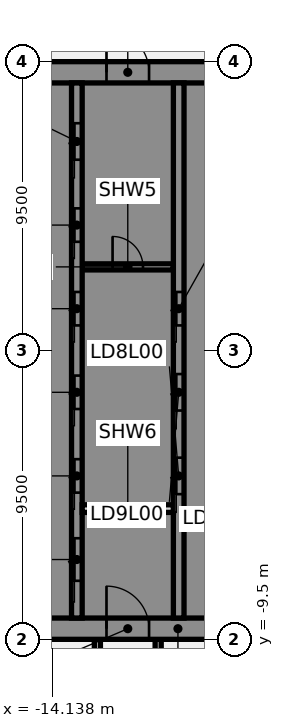
"""IFC4 building model, lengths in metres.
Left out: names, types, materials, properties, quantities, classifications, styles, units other than length and angle.
Written with IfcOpenShell. Run it as: python <this file> out.ifc"""

import sys

from ifc_helpers import new_model, si_unit, direction, frame, frame_2d, origin, place, context, subcontext, project, spatial, polyline, rectangle, outline, extrude, element, fill, save


model = new_model("IFC4")
c1 = context("Model", 3, precision=1e-05, world=origin(), true_north=direction((0.0, 1.0)))
c2 = subcontext(c1, "Body", "Model", "MODEL_VIEW")
j1 = project(units=[si_unit("LENGTHUNIT", "METRE"), si_unit("PLANEANGLEUNIT", "RADIAN")], contexts=[c1])
p1 = place(None, origin())
s1 = spatial("IfcSite", under=j1, at=p1, CompositionType="ELEMENT")
p2 = place(p1, origin())
s2 = spatial("IfcBuilding", under=s1, at=p2, CompositionType="ELEMENT")
p3 = place(p2, origin())
s3 = spatial("IfcBuildingStorey", under=s2, at=p3, CompositionType="ELEMENT", Elevation=0.0)
p4 = place(p3, frame((-10.65, -9.5, 0.0), z_axis=(0.0, 0.0, 1.0), x_axis=(0.0, -1.0, 0.0)))
e1 = element("IfcWall", 1, at=p4, inside=s3, PredefinedType="PARTITIONING", context=c2, shape_type="SweptSolid", body=[
    extrude(rectangle(XDim=1.45, YDim=0.2, at=frame_2d((0.725, 0.0))), origin(), (0.0, 0.0, 1.0), 8.5),
])
p5 = place(p3, frame((-12.65, -9.5, 0.0), z_axis=(0.0, 0.0, 1.0), x_axis=(0.0, -1.0, 0.0)))
e2 = element("IfcWall", 2, at=p5, inside=s3, PredefinedType="PARTITIONING", context=c2, shape_type="SweptSolid", body=[
    extrude(rectangle(XDim=1.47, YDim=0.2, at=frame_2d((0.735, 0.0))), origin(), (0.0, 0.0, 1.0), 8.5),
])
p6 = place(p3, frame((-16.5, -9.15, 0.0), z_axis=(0.0, 0.0, 1.0), x_axis=(1.0, 0.0, 0.0)))
e3 = element("IfcWall", 3, at=p6, inside=s3, PredefinedType="SHEAR", context=c2, shape_type="SweptSolid", body=[
    extrude(rectangle(XDim=13.0, YDim=0.7, at=frame_2d((6.5, 0.0))), origin(), (0.0, 0.0, 1.0), 8.5),
])
p7 = place(p6, frame((4.15, 0.0, 0.0)))
e4 = element("IfcOpeningElement", 4, at=p7, cuts=e3, PredefinedType="OPENING", context=c2, shape_type="SweptSolid", body=[
    extrude(rectangle(XDim=1.4, YDim=2.1, at=frame_2d((0.7, 1.05))), frame((0.0, 0.36, 0.0), z_axis=(0.0, -1.0, 0.0), x_axis=(1.0, 0.0, 0.0)), (0.0, 0.0, 1.0), 0.72),
])
p8 = place(p6, frame((10.125, 0.0, 0.0)))
e5 = element("IfcOpeningElement", 5, at=p8, cuts=e3, PredefinedType="OPENING", context=c2, shape_type="SweptSolid", body=[
    extrude(rectangle(XDim=1.4, YDim=2.1, at=frame_2d((0.7, 1.05))), frame((0.0, 0.36, 0.0), z_axis=(0.0, -1.0, 0.0), x_axis=(1.0, 0.0, 0.0)), (0.0, 0.0, 1.0), 0.72),
])
p9 = place(p3, frame((-16.5, 9.15, 0.0), z_axis=(0.0, 0.0, 1.0), x_axis=(1.0, 0.0, 0.0)))
e6 = element("IfcWall", 6, at=p9, inside=s3, PredefinedType="SHEAR", context=c2, shape_type="SweptSolid", body=[
    extrude(rectangle(XDim=13.0, YDim=0.7, at=frame_2d((6.5, 0.0))), origin(), (0.0, 0.0, 1.0), 8.5),
])
p10 = place(p9, frame((4.15, 0.0, 0.0)))
e7 = element("IfcOpeningElement", 7, at=p10, cuts=e6, PredefinedType="OPENING", context=c2, shape_type="SweptSolid", body=[
    extrude(rectangle(XDim=1.4, YDim=2.1, at=frame_2d((0.7, 1.05))), frame((0.0, 0.36, 0.0), z_axis=(0.0, -1.0, 0.0), x_axis=(1.0, 0.0, 0.0)), (0.0, 0.0, 1.0), 0.72),
])
p11 = place(p3, frame((-13.15, 2.75, 0.0), z_axis=(0.0, 0.0, 1.0), x_axis=(1.0, 0.0, 0.0)))
e8 = element("IfcWall", 8, at=p11, inside=s3, PredefinedType="PARTITIONING", context=c2, shape_type="SweptSolid", body=[
    extrude(rectangle(XDim=3.0, YDim=0.2, at=frame_2d((1.5, 0.0))), origin(), (0.0, 0.0, 1.0), 8.5),
])
p12 = place(p11, frame((1.0, 0.0, 0.0)))
e9 = element("IfcOpeningElement", 9, at=p12, cuts=e8, PredefinedType="OPENING", context=c2, shape_type="SweptSolid", body=[
    extrude(rectangle(XDim=1.0, YDim=2.1, at=frame_2d((0.5, 1.05))), frame((0.0, 0.11, 0.0), z_axis=(0.0, -1.0, 0.0), x_axis=(1.0, 0.0, 0.0)), (0.0, 0.0, 1.0), 0.22),
])
p13 = place(p3, origin())
e10 = element("IfcWall", 10, at=p13, inside=s3, PredefinedType="SHEAR", context=c2, shape_type="SweptSolid", body=[
    extrude(outline(polyline([(-13.5, -8.8), (-13.5, -8.125), (-15.8, -8.125), (-15.8, -5.625), (-13.5, -5.625), (-13.5, -5.375), (-15.8, -5.375), (-15.8, -2.875), (-13.5, -2.875), (-13.5, -2.625), (-15.8, -2.625), (-15.8, -0.125), (-13.5, -0.125), (-13.5, 0.125), (-15.8, 0.125), (-15.8, 2.625), (-13.5, 2.625), (-13.5, 2.875), (-15.8, 2.875), (-15.8, 5.375), (-13.5, 5.375), (-13.5, 5.625), (-15.8, 5.625), (-15.8, 8.125), (-13.5, 8.125), (-13.5, 8.8), (-15.8, 8.8), (-16.5, 8.8), (-16.5, -8.8), (-15.8, -8.8), (-13.5, -8.8)])), origin(), (0.0, 0.0, 1.0), 8.5),
])
p14 = place(p3, origin())
e11 = element("IfcWall", 11, at=p14, inside=s3, PredefinedType="SHEAR", context=c2, shape_type="SweptSolid", body=[
    extrude(outline(polyline([(-9.8, -5.375), (-9.8, -5.625), (-7.5, -5.625), (-7.15, -5.625), (-7.15, 8.8), (-7.5, 8.8), (-9.8, 8.8), (-9.8, 8.125), (-7.5, 8.125), (-7.5, 5.625), (-9.8, 5.625), (-9.8, 5.375), (-7.5, 5.375), (-7.5, 2.875), (-9.8, 2.875), (-9.8, 2.625), (-7.5, 2.625), (-7.5, 0.125), (-9.8, 0.125), (-9.8, -0.125), (-7.5, -0.125), (-7.5, -2.625), (-9.8, -2.625), (-9.8, -2.875), (-7.5, -2.875), (-7.5, -5.375), (-9.8, -5.375)])), origin(), (0.0, 0.0, 1.0), 8.5),
])
p15 = place(p3, origin())
e12 = element("IfcWall", 12, at=p15, inside=s3, PredefinedType="SHEAR", context=c2, shape_type="SweptSolid", body=[
    extrude(outline(polyline([(-7.5, -8.125), (-9.55, -8.125), (-9.55, -5.625), (-9.8, -5.625), (-9.8, -8.125), (-9.8, -8.8), (-7.5, -8.8), (-7.5, -8.125)])), origin(), (0.0, 0.0, 1.0), 8.5),
])
p16 = place(p3, frame((-13.325, -8.8, 0.0), z_axis=(0.0, 0.0, 1.0), x_axis=(0.0, 1.0, 0.0)))
e13 = element("IfcWall", 13, at=p16, inside=s3, PredefinedType="SHEAR", context=c2, shape_type="SweptSolid", body=[
    extrude(rectangle(XDim=17.6, YDim=0.35, at=frame_2d((8.8, 0.0))), origin(), (0.0, 0.0, 1.0), 8.5),
])
p17 = place(p16, frame((1.225, 0.0, 0.0)))
e14 = element("IfcOpeningElement", 14, at=p17, cuts=e13, PredefinedType="OPENING", context=c2, shape_type="SweptSolid", body=[
    extrude(rectangle(XDim=1.4, YDim=2.1, at=frame_2d((0.7, 1.05))), frame((0.0, 0.185, 0.0), z_axis=(0.0, -1.0, 0.0), x_axis=(1.0, 0.0, 0.0)), (0.0, 0.0, 1.0), 0.37),
])
p18 = place(p16, frame((4.125, 0.0, 0.0)))
e15 = element("IfcOpeningElement", 15, at=p18, cuts=e13, PredefinedType="OPENING", context=c2, shape_type="SweptSolid", body=[
    extrude(rectangle(XDim=1.1, YDim=2.1, at=frame_2d((0.55, 1.05))), frame((0.0, 0.185, 0.0), z_axis=(0.0, -1.0, 0.0), x_axis=(1.0, 0.0, 0.0)), (0.0, 0.0, 1.0), 0.37),
])
p19 = place(p16, frame((6.875, 0.0, 0.0)))
e16 = element("IfcOpeningElement", 16, at=p19, cuts=e13, PredefinedType="OPENING", context=c2, shape_type="SweptSolid", body=[
    extrude(rectangle(XDim=1.1, YDim=2.1, at=frame_2d((0.55, 1.05))), frame((0.0, 0.185, 0.0), z_axis=(0.0, -1.0, 0.0), x_axis=(1.0, 0.0, 0.0)), (0.0, 0.0, 1.0), 0.37),
])
p20 = place(p16, frame((9.625, 0.0, 0.0)))
e17 = element("IfcOpeningElement", 17, at=p20, cuts=e13, PredefinedType="OPENING", context=c2, shape_type="SweptSolid", body=[
    extrude(rectangle(XDim=1.1, YDim=2.1, at=frame_2d((0.55, 1.05))), frame((0.0, 0.185, 0.0), z_axis=(0.0, -1.0, 0.0), x_axis=(1.0, 0.0, 0.0)), (0.0, 0.0, 1.0), 0.37),
])
p21 = place(p16, frame((12.375, 0.0, 0.0)))
e18 = element("IfcOpeningElement", 18, at=p21, cuts=e13, PredefinedType="OPENING", context=c2, shape_type="SweptSolid", body=[
    extrude(rectangle(XDim=1.1, YDim=2.1, at=frame_2d((0.55, 1.05))), frame((0.0, 0.185, 0.0), z_axis=(0.0, -1.0, 0.0), x_axis=(1.0, 0.0, 0.0)), (0.0, 0.0, 1.0), 0.37),
])
p22 = place(p16, frame((15.075, 0.0, 0.0)))
e19 = element("IfcOpeningElement", 19, at=p22, cuts=e13, PredefinedType="OPENING", context=c2, shape_type="SweptSolid", body=[
    extrude(rectangle(XDim=1.2, YDim=2.1, at=frame_2d((0.6, 1.05))), frame((0.0, 0.185, 0.0), z_axis=(0.0, -1.0, 0.0), x_axis=(1.0, 0.0, 0.0)), (0.0, 0.0, 1.0), 0.37),
])
p23 = place(p3, frame((-9.975, -8.8, 0.0), z_axis=(0.0, 0.0, 1.0), x_axis=(0.0, 1.0, 0.0)))
e20 = element("IfcWall", 20, at=p23, inside=s3, PredefinedType="SHEAR", context=c2, shape_type="SweptSolid", body=[
    extrude(rectangle(XDim=17.6, YDim=0.35, at=frame_2d((8.8, 0.0))), origin(), (0.0, 0.0, 1.0), 8.5),
])
p24 = place(p23, frame((4.075, 0.0, 0.0)))
e21 = element("IfcOpeningElement", 21, at=p24, cuts=e20, PredefinedType="OPENING", context=c2, shape_type="SweptSolid", body=[
    extrude(rectangle(XDim=1.2, YDim=2.1, at=frame_2d((0.6, 1.05))), frame((0.0, 0.185, 0.0), z_axis=(0.0, -1.0, 0.0), x_axis=(1.0, 0.0, 0.0)), (0.0, 0.0, 1.0), 0.37),
])
p25 = place(p23, frame((6.825, 0.0, 0.0)))
e22 = element("IfcOpeningElement", 22, at=p25, cuts=e20, PredefinedType="OPENING", context=c2, shape_type="SweptSolid", body=[
    extrude(rectangle(XDim=1.2, YDim=2.1, at=frame_2d((0.6, 1.05))), frame((0.0, 0.185, 0.0), z_axis=(0.0, -1.0, 0.0), x_axis=(1.0, 0.0, 0.0)), (0.0, 0.0, 1.0), 0.37),
])
p26 = place(p23, frame((9.625, 0.0, 0.0)))
e23 = element("IfcOpeningElement", 23, at=p26, cuts=e20, PredefinedType="OPENING", context=c2, shape_type="SweptSolid", body=[
    extrude(rectangle(XDim=1.1, YDim=2.1, at=frame_2d((0.55, 1.05))), frame((0.0, 0.185, 0.0), z_axis=(0.0, -1.0, 0.0), x_axis=(1.0, 0.0, 0.0)), (0.0, 0.0, 1.0), 0.37),
])
p27 = place(p3, frame((-13.15, -5.2, 0.0), z_axis=(0.0, 0.0, 1.0), x_axis=(1.0, 0.0, 0.0)))
e24 = element("IfcWall", 24, at=p27, inside=s3, PredefinedType="PARTITIONING", context=c2, shape_type="SweptSolid", body=[
    extrude(rectangle(XDim=3.0, YDim=0.25, at=frame_2d((1.5, 0.0))), origin(), (0.0, 0.0, 1.0), 8.5),
])
p28 = place(p7, origin())
e25 = element("IfcDoor", 25, at=p28, inside=s3, OperationType="SINGLE_SWING_LEFT", PredefinedType="DOOR", context=c2, shape_type="SweptSolid", body=[
    extrude(rectangle(XDim=1.4, YDim=2.1, at=frame_2d((0.7, 1.05))), frame((0.0, 0.025, 0.0), z_axis=(0.0, -1.0, 0.0), x_axis=(1.0, 0.0, 0.0)), (0.0, 0.0, 1.0), 0.05),
])
fill(e4, e25)
p29 = place(p10, origin())
e26 = element("IfcDoor", 26, at=p29, inside=s3, OperationType="SINGLE_SWING_LEFT", PredefinedType="DOOR", context=c2, shape_type="SweptSolid", body=[
    extrude(rectangle(XDim=1.4, YDim=2.1, at=frame_2d((0.7, 1.05))), frame((0.0, 0.025, 0.0), z_axis=(0.0, -1.0, 0.0), x_axis=(1.0, 0.0, 0.0)), (0.0, 0.0, 1.0), 0.05),
])
fill(e7, e26)
p30 = place(p17, origin())
e27 = element("IfcDoor", 27, at=p30, inside=s3, OperationType="SLIDING_TO_LEFT", PredefinedType="DOOR", context=c2, shape_type="SweptSolid", body=[
    extrude(rectangle(XDim=1.4, YDim=2.1, at=frame_2d((0.7, 1.05))), frame((0.0, 0.025, 0.0), z_axis=(0.0, -1.0, 0.0), x_axis=(1.0, 0.0, 0.0)), (0.0, 0.0, 1.0), 0.05),
])
fill(e14, e27)
p31 = place(p18, origin())
e28 = element("IfcDoor", 28, at=p31, inside=s3, OperationType="SLIDING_TO_LEFT", PredefinedType="DOOR", context=c2, shape_type="SweptSolid", body=[
    extrude(rectangle(XDim=1.1, YDim=2.1, at=frame_2d((0.55, 1.05))), frame((0.0, 0.025, 0.0), z_axis=(0.0, -1.0, 0.0), x_axis=(1.0, 0.0, 0.0)), (0.0, 0.0, 1.0), 0.05),
])
fill(e15, e28)
p32 = place(p19, origin())
e29 = element("IfcDoor", 29, at=p32, inside=s3, OperationType="SLIDING_TO_LEFT", PredefinedType="DOOR", context=c2, shape_type="SweptSolid", body=[
    extrude(rectangle(XDim=1.1, YDim=2.1, at=frame_2d((0.55, 1.05))), frame((0.0, 0.025, 0.0), z_axis=(0.0, -1.0, 0.0), x_axis=(1.0, 0.0, 0.0)), (0.0, 0.0, 1.0), 0.05),
])
fill(e16, e29)
p33 = place(p20, origin())
e30 = element("IfcDoor", 30, at=p33, inside=s3, OperationType="SLIDING_TO_LEFT", PredefinedType="DOOR", context=c2, shape_type="SweptSolid", body=[
    extrude(rectangle(XDim=1.1, YDim=2.1, at=frame_2d((0.55, 1.05))), frame((0.0, 0.025, 0.0), z_axis=(0.0, -1.0, 0.0), x_axis=(1.0, 0.0, 0.0)), (0.0, 0.0, 1.0), 0.05),
])
fill(e17, e30)
p34 = place(p21, origin())
e31 = element("IfcDoor", 31, at=p34, inside=s3, OperationType="SLIDING_TO_LEFT", PredefinedType="DOOR", context=c2, shape_type="SweptSolid", body=[
    extrude(rectangle(XDim=1.1, YDim=2.1, at=frame_2d((0.55, 1.05))), frame((0.0, 0.025, 0.0), z_axis=(0.0, -1.0, 0.0), x_axis=(1.0, 0.0, 0.0)), (0.0, 0.0, 1.0), 0.05),
])
fill(e18, e31)
p35 = place(p22, origin())
e32 = element("IfcDoor", 32, at=p35, inside=s3, OperationType="SLIDING_TO_LEFT", PredefinedType="DOOR", context=c2, shape_type="SweptSolid", body=[
    extrude(rectangle(XDim=1.2, YDim=2.1, at=frame_2d((0.6, 1.05))), frame((0.0, 0.025, 0.0), z_axis=(0.0, -1.0, 0.0), x_axis=(1.0, 0.0, 0.0)), (0.0, 0.0, 1.0), 0.05),
])
fill(e19, e32)
p36 = place(p24, origin())
e33 = element("IfcDoor", 33, at=p36, inside=s3, OperationType="SLIDING_TO_LEFT", PredefinedType="DOOR", context=c2, shape_type="SweptSolid", body=[
    extrude(rectangle(XDim=1.2, YDim=2.1, at=frame_2d((0.6, 1.05))), frame((0.0, 0.025, 0.0), z_axis=(0.0, -1.0, 0.0), x_axis=(1.0, 0.0, 0.0)), (0.0, 0.0, 1.0), 0.05),
])
fill(e21, e33)
p37 = place(p25, origin())
e34 = element("IfcDoor", 34, at=p37, inside=s3, OperationType="SLIDING_TO_LEFT", PredefinedType="DOOR", context=c2, shape_type="SweptSolid", body=[
    extrude(rectangle(XDim=1.2, YDim=2.1, at=frame_2d((0.6, 1.05))), frame((0.0, 0.025, 0.0), z_axis=(0.0, -1.0, 0.0), x_axis=(1.0, 0.0, 0.0)), (0.0, 0.0, 1.0), 0.05),
])
fill(e22, e34)
p38 = place(p26, origin())
e35 = element("IfcDoor", 35, at=p38, inside=s3, OperationType="SLIDING_TO_LEFT", PredefinedType="DOOR", context=c2, shape_type="SweptSolid", body=[
    extrude(rectangle(XDim=1.1, YDim=2.1, at=frame_2d((0.55, 1.05))), frame((0.0, 0.025, 0.0), z_axis=(0.0, -1.0, 0.0), x_axis=(1.0, 0.0, 0.0)), (0.0, 0.0, 1.0), 0.05),
])
fill(e23, e35)
p39 = place(p12, origin())
e36 = element("IfcDoor", 36, at=p39, inside=s3, OperationType="SINGLE_SWING_LEFT", PredefinedType="DOOR", context=c2, shape_type="SweptSolid", body=[
    extrude(rectangle(XDim=1.0, YDim=2.1, at=frame_2d((0.5, 1.05))), frame((0.0, 0.025, 0.0), z_axis=(0.0, -1.0, 0.0), x_axis=(1.0, 0.0, 0.0)), (0.0, 0.0, 1.0), 0.05),
])
fill(e9, e36)
save(model, sys.argv[1])
